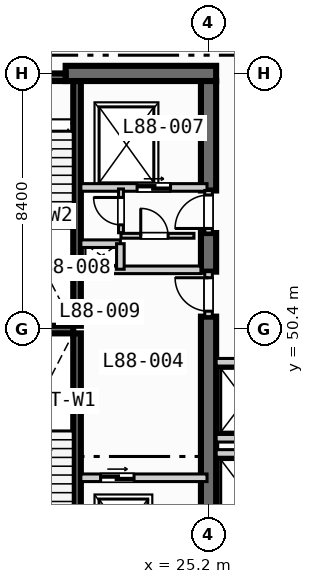
"""IFC4 building model, lengths in metres.
Left out: names, types, materials, properties, quantities, classifications, styles, units other than length and angle.
Written with IfcOpenShell. Run it as: python <this file> out.ifc"""

import sys

from ifc_helpers import new_model, si_unit, direction, frame, frame_2d, origin, place, context, subcontext, project, spatial, rectangle, extrude, element, fill, save


model = new_model("IFC4")
c1 = context("Model", 3, precision=1e-05, world=origin(), true_north=direction((0.0, 1.0)))
c2 = subcontext(c1, "Body", "Model", "MODEL_VIEW")
j1 = project(units=[si_unit("LENGTHUNIT", "METRE"), si_unit("PLANEANGLEUNIT", "RADIAN")], contexts=[c1])
p1 = place(None, origin())
s1 = spatial("IfcSite", under=j1, at=p1, CompositionType="ELEMENT")
p2 = place(p1, origin())
s2 = spatial("IfcBuilding", under=s1, at=p2, CompositionType="ELEMENT")
p3 = place(p2, frame((0.0, 0.0, 355.4)))
s3 = spatial("IfcBuildingStorey", under=s2, at=p3, CompositionType="ELEMENT", Elevation=355.4)
for number, where, z_axis, x_axis in (
    (1, (20.875, 42.2, 0.0), (0.0, 0.0, 1.0), (0.0, 1.0, 0.0)),
    (2, (20.875, 50.5, 0.0), (0.0, 0.0, 1.0), (0.0, 1.0, 0.0)),
):
    element("IfcWall", number, at=place(p3, frame(where, z_axis=z_axis, x_axis=x_axis)), inside=s3, PredefinedType="SOLIDWALL", context=c2, shape_type="SweptSolid", body=[
        extrude(rectangle(XDim=8.05, YDim=0.25, at=frame_2d((4.025, 0.0))), origin(), (0.0, 0.0, 1.0), 3.97),
    ])
p4 = place(p3, frame((17.25, 50.375, 0.0), z_axis=(0.0, 0.0, 1.0), x_axis=(1.0, 0.0, 0.0)))
e3 = element("IfcWall", 3, at=p4, inside=s3, PredefinedType="SOLIDWALL", context=c2, shape_type="SweptSolid", body=[
    extrude(rectangle(XDim=3.5, YDim=0.25, at=frame_2d((1.75, 0.0))), origin(), (0.0, 0.0, 1.0), 3.97),
])
p5 = place(p3, frame((20.5, 58.8, 0.0), z_axis=(0.0, 0.0, 1.0), x_axis=(1.0, 0.0, 0.0)))
e4 = element("IfcWall", 4, at=p5, inside=s3, PredefinedType="SHEAR", context=c2, shape_type="SweptSolid", body=[
    extrude(rectangle(XDim=4.95, YDim=0.5, at=frame_2d((2.475, 0.0))), origin(), (0.0, 0.0, 1.0), 3.97),
])
p6 = place(p3, frame((25.2, 42.2, 0.0), z_axis=(0.0, 0.0, 1.0), x_axis=(0.0, 1.0, 0.0)))
e5 = element("IfcWall", 5, at=p6, inside=s3, PredefinedType="SHEAR", context=c2, shape_type="SweptSolid", body=[
    extrude(rectangle(XDim=8.6, YDim=0.5, at=frame_2d((4.3, 0.0))), origin(), (0.0, 0.0, 1.0), 3.97),
])
p7 = place(p3, frame((25.2, 52.28, 0.0), z_axis=(0.0, 0.0, 1.0), x_axis=(0.0, 1.0, 0.0)))
e6 = element("IfcWall", 6, at=p7, inside=s3, PredefinedType="SHEAR", context=c2, shape_type="SweptSolid", body=[
    extrude(rectangle(XDim=1.27, YDim=0.5, at=frame_2d((0.635, 0.0))), origin(), (0.0, 0.0, 1.0), 3.97),
])
p8 = place(p3, frame((25.2, 54.95, 0.0), z_axis=(0.0, 0.0, 1.0), x_axis=(0.0, 1.0, 0.0)))
e7 = element("IfcWall", 7, at=p8, inside=s3, PredefinedType="SHEAR", context=c2, shape_type="SweptSolid", body=[
    extrude(rectangle(XDim=3.6, YDim=0.5, at=frame_2d((1.8, 0.0))), origin(), (0.0, 0.0, 1.0), 3.97),
])
p9 = place(p3, frame((18.0, 58.675, 0.0), z_axis=(0.0, 0.0, 1.0), x_axis=(1.0, 0.0, 0.0)))
e8 = element("IfcWall", 8, at=p9, inside=s3, PredefinedType="SOLIDWALL", context=c2, shape_type="SweptSolid", body=[
    extrude(rectangle(XDim=2.5, YDim=0.25, at=frame_2d((1.25, 0.0))), origin(), (0.0, 0.0, 1.0), 3.97),
])
p10 = place(p9, frame((0.7, 0.0, 0.0)))
e9 = element("IfcOpeningElement", 9, at=p10, cuts=e8, PredefinedType="OPENING", context=c2, shape_type="SweptSolid", body=[
    extrude(rectangle(XDim=1.1, YDim=2.15, at=frame_2d((0.55, 1.075))), frame((0.0, 0.135, 0.0), z_axis=(0.0, -1.0, 0.0), x_axis=(1.0, 0.0, 0.0)), (0.0, 0.0, 1.0), 0.27),
])
p11 = place(p3, frame((21.0, 45.5, 0.0), z_axis=(0.0, 0.0, 1.0), x_axis=(1.0, 0.0, 0.0)))
e10 = element("IfcWall", 10, at=p11, inside=s3, PredefinedType="SOLIDWALL", context=c2, shape_type="SweptSolid", body=[
    extrude(rectangle(XDim=4.15, YDim=0.25, at=frame_2d((2.075, 0.0))), origin(), (0.0, 0.0, 1.0), 3.97),
])
p12 = place(p11, frame((0.65, 0.0, 0.0)))
e11 = element("IfcOpeningElement", 11, at=p12, cuts=e10, PredefinedType="OPENING", context=c2, shape_type="SweptSolid", body=[
    extrude(rectangle(XDim=1.1, YDim=2.15, at=frame_2d((0.55, 1.075))), frame((0.0, 0.135, 0.0), z_axis=(0.0, -1.0, 0.0), x_axis=(1.0, 0.0, 0.0)), (0.0, 0.0, 1.0), 0.27),
])
p13 = place(p3, frame((25.2, 50.8, 0.0), z_axis=(0.0, 0.0, 1.0), x_axis=(0.0, 1.0, 0.0)))
e12 = element("IfcWall", 12, at=p13, inside=s3, PredefinedType="SOLIDWALL", context=c2, shape_type="SweptSolid", body=[
    extrude(rectangle(XDim=1.48, YDim=0.25, at=frame_2d((0.74, 0.0))), origin(), (0.0, 0.0, 1.0), 3.97),
])
p14 = place(p13, frame((0.18, 0.0, 0.0)))
e13 = element("IfcOpeningElement", 13, at=p14, cuts=e12, PredefinedType="OPENING", context=c2, shape_type="SweptSolid", body=[
    extrude(rectangle(XDim=1.1, YDim=2.15, at=frame_2d((0.55, 1.075))), frame((0.0, 0.135, 0.0), z_axis=(0.0, -1.0, 0.0), x_axis=(1.0, 0.0, 0.0)), (0.0, 0.0, 1.0), 0.27),
])
p15 = place(p3, frame((21.0, 52.34, 0.0), z_axis=(0.0, 0.0, 1.0), x_axis=(1.0, 0.0, 0.0)))
e14 = element("IfcWall", 14, at=p15, inside=s3, PredefinedType="SOLIDWALL", context=c2, shape_type="SweptSolid", body=[
    extrude(rectangle(XDim=3.95, YDim=0.25, at=frame_2d((1.975, 0.0))), origin(), (0.0, 0.0, 1.0), 3.97),
])
p16 = place(p3, frame((21.0, 55.05, 0.0), z_axis=(0.0, 0.0, 1.0), x_axis=(1.0, 0.0, 0.0)))
e15 = element("IfcWall", 15, at=p16, inside=s3, PredefinedType="SOLIDWALL", context=c2, shape_type="SweptSolid", body=[
    extrude(rectangle(XDim=4.15, YDim=0.25, at=frame_2d((2.075, 0.0))), origin(), (0.0, 0.0, 1.0), 3.97),
])
p17 = place(p16, frame((1.85, 0.0, 0.0)))
e16 = element("IfcOpeningElement", 16, at=p17, cuts=e15, PredefinedType="OPENING", context=c2, shape_type="SweptSolid", body=[
    extrude(rectangle(XDim=1.1, YDim=2.15, at=frame_2d((0.55, 1.075))), frame((0.0, 0.135, 0.0), z_axis=(0.0, -1.0, 0.0), x_axis=(1.0, 0.0, 0.0)), (0.0, 0.0, 1.0), 0.27),
])
p18 = place(p3, frame((25.2, 53.55, 0.0), z_axis=(0.0, 0.0, 1.0), x_axis=(0.0, 1.0, 0.0)))
e17 = element("IfcWall", 17, at=p18, inside=s3, PredefinedType="SOLIDWALL", context=c2, shape_type="SweptSolid", body=[
    extrude(rectangle(XDim=1.4, YDim=0.25, at=frame_2d((0.7, 0.0))), origin(), (0.0, 0.0, 1.0), 3.97),
])
p19 = place(p18, frame((0.15, 0.0, 0.0)))
e18 = element("IfcOpeningElement", 18, at=p19, cuts=e17, PredefinedType="OPENING", context=c2, shape_type="SweptSolid", body=[
    extrude(rectangle(XDim=1.1, YDim=2.15, at=frame_2d((0.55, 1.075))), frame((0.0, 0.135, 0.0), z_axis=(0.0, -1.0, 0.0), x_axis=(1.0, 0.0, 0.0)), (0.0, 0.0, 1.0), 0.27),
])
p20 = place(p3, frame((21.0, 53.2, 0.0), z_axis=(0.0, 0.0, 1.0), x_axis=(1.0, 0.0, 0.0)))
e19 = element("IfcWall", 19, at=p20, inside=s3, PredefinedType="SOLIDWALL", context=c2, shape_type="SweptSolid", body=[
    extrude(rectangle(XDim=1.3, YDim=0.25, at=frame_2d((0.65, 0.0))), origin(), (0.0, 0.0, 1.0), 3.97),
])
p21 = place(p3, frame((22.3, 52.36, 0.0), z_axis=(0.0, 0.0, 1.0), x_axis=(0.0, 1.0, 0.0)))
e20 = element("IfcWall", 20, at=p21, inside=s3, PredefinedType="SOLIDWALL", context=c2, shape_type="SweptSolid", body=[
    extrude(rectangle(XDim=0.84, YDim=0.25, at=frame_2d((0.42, 0.0))), origin(), (0.0, 0.0, 1.0), 3.97),
])
p22 = place(p3, frame((22.32, 53.56, 0.0), z_axis=(0.0, 0.0, 1.0), x_axis=(0.0, 1.0, 0.0)))
e21 = element("IfcWall", 21, at=p22, inside=s3, PredefinedType="PARTITIONING", context=c2, shape_type="SweptSolid", body=[
    extrude(rectangle(XDim=1.44, YDim=0.16, at=frame_2d((0.72, 0.0))), origin(), (0.0, 0.0, 1.0), 3.97),
])
p23 = place(p22, frame((0.26, 0.0, 0.0)))
e22 = element("IfcOpeningElement", 22, at=p23, cuts=e21, PredefinedType="OPENING", context=c2, shape_type="SweptSolid", body=[
    extrude(rectangle(XDim=0.9, YDim=2.1, at=frame_2d((0.45, 1.05))), frame((0.0, 0.09, 0.0), z_axis=(0.0, -1.0, 0.0), x_axis=(1.0, 0.0, 0.0)), (0.0, 0.0, 1.0), 0.18),
])
p24 = place(p3, frame((22.32, 53.46, 0.0), z_axis=(0.0, 0.0, 1.0), x_axis=(1.0, 0.0, 0.0)))
e23 = element("IfcWall", 23, at=p24, inside=s3, PredefinedType="PARTITIONING", context=c2, shape_type="SweptSolid", body=[
    extrude(rectangle(XDim=2.4, YDim=0.16, at=frame_2d((1.2, 0.0))), origin(), (0.0, 0.0, 1.0), 3.97),
])
p25 = place(p24, frame((0.65, 0.0, 0.0)))
e24 = element("IfcOpeningElement", 24, at=p25, cuts=e23, PredefinedType="OPENING", context=c2, shape_type="SweptSolid", body=[
    extrude(rectangle(XDim=0.9, YDim=2.1, at=frame_2d((0.45, 1.05))), frame((0.0, 0.09, 0.0), z_axis=(0.0, -1.0, 0.0), x_axis=(1.0, 0.0, 0.0)), (0.0, 0.0, 1.0), 0.18),
])
for number, where, z_axis, x_axis in (
    (25, (25.45, 46.3, 0.0), (0.0, 0.0, 1.0), (1.0, 0.0, 0.0)),
    (26, (25.45, 46.8, 0.0), (0.0, 0.0, 1.0), (1.0, 0.0, 0.0)),
    (27, (25.45, 49.3, 0.0), (0.0, 0.0, 1.0), (1.0, 0.0, 0.0)),
):
    element("IfcWall", number, at=place(p3, frame(where, z_axis=z_axis, x_axis=x_axis)), inside=s3, PredefinedType="SOLIDWALL", context=c2, shape_type="SweptSolid", body=[
        extrude(rectangle(XDim=1.825, YDim=0.25, at=frame_2d((0.913, 0.0))), origin(), (0.0, 0.0, 1.0), 3.97),
    ])
p26 = place(p12, origin())
e28 = element("IfcDoor", 28, at=p26, inside=s3, OperationType="SLIDING_TO_LEFT", PredefinedType="DOOR", context=c2, shape_type="SweptSolid", body=[
    extrude(rectangle(XDim=1.1, YDim=2.15, at=frame_2d((0.55, 1.075))), frame((0.0, 0.025, 0.0), z_axis=(0.0, -1.0, 0.0), x_axis=(1.0, 0.0, 0.0)), (0.0, 0.0, 1.0), 0.05),
])
fill(e11, e28)
p27 = place(p14, origin())
e29 = element("IfcDoor", 29, at=p27, inside=s3, OperationType="SINGLE_SWING_RIGHT", PredefinedType="DOOR", context=c2, shape_type="SweptSolid", body=[
    extrude(rectangle(XDim=1.1, YDim=2.15, at=frame_2d((0.55, 1.075))), frame((0.0, 0.025, 0.0), z_axis=(0.0, -1.0, 0.0), x_axis=(1.0, 0.0, 0.0)), (0.0, 0.0, 1.0), 0.05),
])
fill(e13, e29)
p28 = place(p17, origin())
e30 = element("IfcDoor", 30, at=p28, inside=s3, OperationType="SLIDING_TO_LEFT", PredefinedType="DOOR", context=c2, shape_type="SweptSolid", body=[
    extrude(rectangle(XDim=1.1, YDim=2.15, at=frame_2d((0.55, 1.075))), frame((0.0, 0.025, 0.0), z_axis=(0.0, -1.0, 0.0), x_axis=(1.0, 0.0, 0.0)), (0.0, 0.0, 1.0), 0.05),
])
fill(e16, e30)
p29 = place(p19, origin())
e31 = element("IfcDoor", 31, at=p29, inside=s3, OperationType="SINGLE_SWING_LEFT", PredefinedType="DOOR", context=c2, shape_type="SweptSolid", body=[
    extrude(rectangle(XDim=1.1, YDim=2.15, at=frame_2d((0.55, 1.075))), frame((0.0, 0.025, 0.0), z_axis=(0.0, -1.0, 0.0), x_axis=(1.0, 0.0, 0.0)), (0.0, 0.0, 1.0), 0.05),
])
fill(e18, e31)
p30 = place(p23, origin())
e32 = element("IfcDoor", 32, at=p30, inside=s3, OperationType="SINGLE_SWING_RIGHT", PredefinedType="DOOR", context=c2, shape_type="SweptSolid", body=[
    extrude(rectangle(XDim=0.9, YDim=2.1, at=frame_2d((0.45, 1.05))), frame((0.0, 0.025, 0.0), z_axis=(0.0, -1.0, 0.0), x_axis=(1.0, 0.0, 0.0)), (0.0, 0.0, 1.0), 0.05),
])
fill(e22, e32)
p31 = place(p25, origin())
e33 = element("IfcDoor", 33, at=p31, inside=s3, OperationType="SINGLE_SWING_LEFT", PredefinedType="DOOR", context=c2, shape_type="SweptSolid", body=[
    extrude(rectangle(XDim=0.9, YDim=2.1, at=frame_2d((0.45, 1.05))), frame((0.0, 0.025, 0.0), z_axis=(0.0, -1.0, 0.0), x_axis=(1.0, 0.0, 0.0)), (0.0, 0.0, 1.0), 0.05),
])
fill(e24, e33)
save(model, sys.argv[1])
